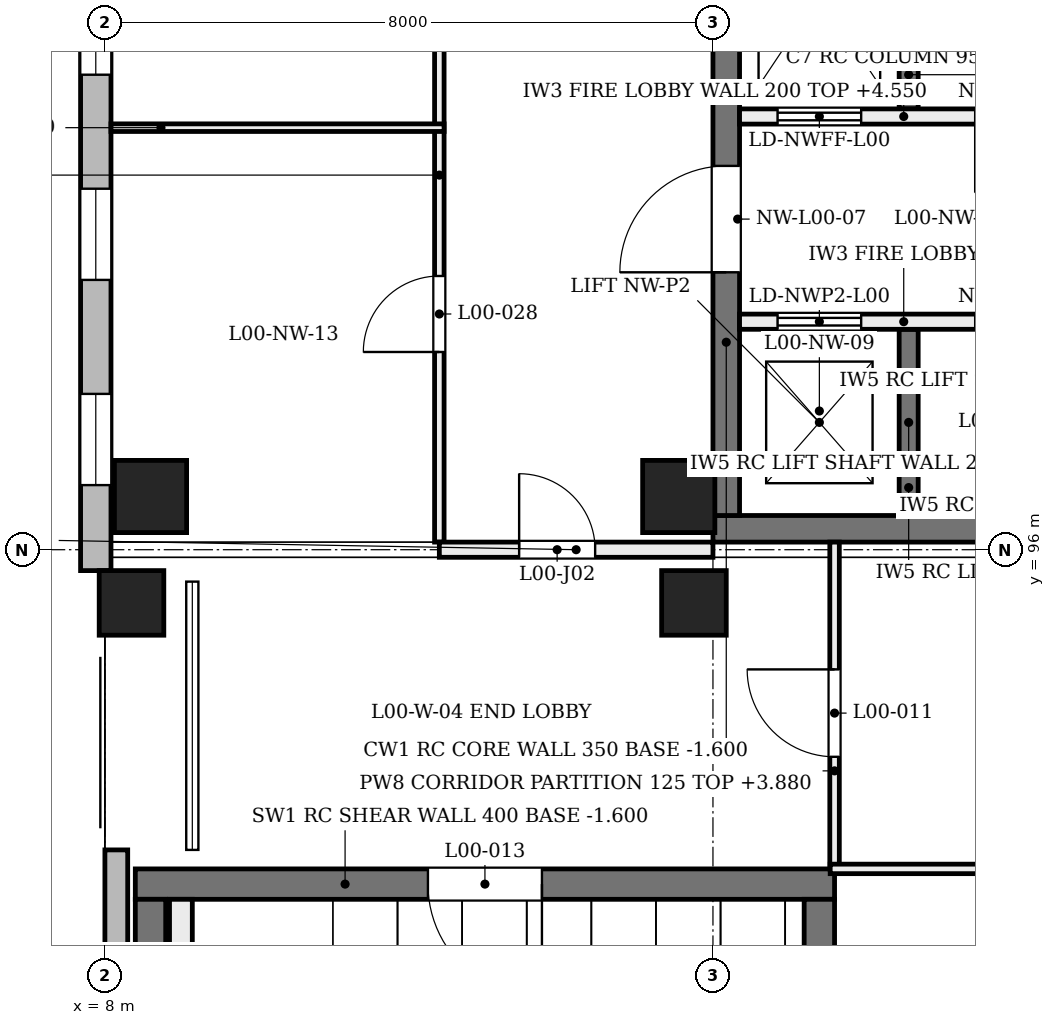
"""IFC4 building model, lengths in metres.
Left out: names, types, materials, properties, quantities, classifications, styles, units other than length and angle.
Written with IfcOpenShell. Run it as: python <this file> out.ifc"""

import sys

from ifc_helpers import new_model, si_unit, direction, frame, frame_2d, origin, origin_2d, place, context, subcontext, project, spatial, rectangle, extrude, element, fill, save


model = new_model("IFC4")
c1 = context("Model", 3, precision=1e-05, world=origin(), true_north=direction((0.0, 1.0)))
c2 = subcontext(c1, "Body", "Model", "MODEL_VIEW")
j1 = project(units=[si_unit("LENGTHUNIT", "METRE"), si_unit("PLANEANGLEUNIT", "RADIAN")], contexts=[c1])
p1 = place(None, origin())
s1 = spatial("IfcSite", under=j1, at=p1, CompositionType="ELEMENT")
p2 = place(p1, origin())
s2 = spatial("IfcBuilding", under=s1, at=p2, CompositionType="ELEMENT")
p3 = place(p2, origin())
s3 = spatial("IfcBuildingStorey", under=s2, at=p3, CompositionType="ELEMENT", Elevation=0.0)
p4 = place(p3, frame((8.4, 91.6, -1.6), z_axis=(0.0, 0.0, 1.0), x_axis=(1.0, 0.0, 0.0)))
e1 = element("IfcWall", 1, at=p4, inside=s3, PredefinedType="SHEAR", context=c2, shape_type="SweptSolid", body=[
    extrude(rectangle(XDim=9.2, YDim=0.4, at=frame_2d((4.6, 0.0))), origin(), (0.0, 0.0, 1.0), 6.18),
])
p5 = place(p4, frame((3.85, 0.0, 1.6)))
e2 = element("IfcOpeningElement", 2, at=p5, cuts=e1, PredefinedType="OPENING", context=c2, shape_type="SweptSolid", body=[
    extrude(rectangle(XDim=1.5, YDim=2.1, at=frame_2d((0.75, 1.05))), frame((0.0, 0.21, 0.0), z_axis=(0.0, -1.0, 0.0), x_axis=(1.0, 0.0, 0.0)), (0.0, 0.0, 1.0), 0.42),
])
p6 = place(p3, frame((8.6, 84.0, -1.6), z_axis=(0.0, 0.0, 1.0), x_axis=(0.0, 1.0, 0.0)))
e3 = element("IfcWall", 3, at=p6, inside=s3, PredefinedType="SHEAR", context=c2, shape_type="SweptSolid", body=[
    extrude(rectangle(XDim=7.4, YDim=0.4, at=frame_2d((3.7, 0.0))), origin(), (0.0, 0.0, 1.0), 6.18),
])
p7 = place(p3, frame((17.4, 84.0, -1.6), z_axis=(0.0, 0.0, 1.0), x_axis=(0.0, 1.0, 0.0)))
e4 = element("IfcWall", 4, at=p7, inside=s3, PredefinedType="SHEAR", context=c2, shape_type="SweptSolid", body=[
    extrude(rectangle(XDim=7.4, YDim=0.4, at=frame_2d((3.7, 0.0))), origin(), (0.0, 0.0, 1.0), 6.18),
])
p8 = place(p7, frame((3.4, 0.0, 5.48)))
e5 = element("IfcOpeningElement", 5, at=p8, cuts=e4, PredefinedType="OPENING", context=c2, shape_type="SweptSolid", body=[
    extrude(rectangle(XDim=0.6, YDim=0.5, at=frame_2d((0.3, 0.25))), frame((0.0, 0.21, 0.0), z_axis=(0.0, -1.0, 0.0), x_axis=(1.0, 0.0, 0.0)), (0.0, 0.0, 1.0), 0.42),
])
p9 = place(p3, frame((16.0, 96.275, -1.6), z_axis=(0.0, 0.0, 1.0), x_axis=(1.0, 0.0, 0.0)))
e6 = element("IfcWall", 6, at=p9, inside=s3, PredefinedType="SHEAR", context=c2, shape_type="SweptSolid", body=[
    extrude(rectangle(XDim=8.275, YDim=0.35, at=frame_2d((4.137, 0.0))), origin(), (0.0, 0.0, 1.0), 6.18),
])
p10 = place(p3, frame((16.175, 96.45, -1.6), z_axis=(0.0, 0.0, 1.0), x_axis=(0.0, 1.0, 0.0)))
e7 = element("IfcWall", 7, at=p10, inside=s3, PredefinedType="SHEAR", context=c2, shape_type="SweptSolid", body=[
    extrude(rectangle(XDim=15.2, YDim=0.35, at=frame_2d((7.6, 0.0))), origin(), (0.0, 0.0, 1.0), 6.18),
])
p11 = place(p10, frame((13.25, 0.0, 1.6)))
e8 = element("IfcOpeningElement", 8, at=p11, cuts=e7, PredefinedType="OPENING", context=c2, shape_type="SweptSolid", body=[
    extrude(rectangle(XDim=1.0, YDim=2.1, at=frame_2d((0.5, 1.05))), frame((0.0, 0.185, 0.0), z_axis=(0.0, -1.0, 0.0), x_axis=(1.0, 0.0, 0.0)), (0.0, 0.0, 1.0), 0.37),
])
p12 = place(p10, frame((3.2, 0.0, 1.6)))
e9 = element("IfcOpeningElement", 9, at=p12, cuts=e7, PredefinedType="OPENING", context=c2, shape_type="SweptSolid", body=[
    extrude(rectangle(XDim=1.4, YDim=2.1, at=frame_2d((0.7, 1.05))), frame((0.0, 0.185, 0.0), z_axis=(0.0, -1.0, 0.0), x_axis=(1.0, 0.0, 0.0)), (0.0, 0.0, 1.0), 0.37),
])
for number, where, z_axis, x_axis in (
    (10, (8.6, 96.7, -1.6), (0.0, 0.0, 1.0), (1.0, 0.0, 0.0)),
    (11, (15.55, 96.7, -1.6), (0.0, 0.0, 1.0), (1.0, 0.0, 0.0)),
):
    element("IfcColumn", number, at=place(p3, frame(where, z_axis=z_axis, x_axis=x_axis)), inside=s3, PredefinedType="COLUMN", context=c2, shape_type="SweptSolid", body=[
        extrude(rectangle(XDim=0.95, YDim=0.95, at=origin_2d()), origin(), (0.0, 0.0, 1.0), 6.4),
    ])
for number, where, z_axis, x_axis in (
    (12, (8.933, 95.3, -1.6), (-0.204, 0.0, 0.979), (0.0, -1.0, 0.0)),
    (13, (16.333, 95.3, -1.6), (-0.204, 0.0, 0.979), (0.0, -1.0, 0.0)),
):
    element("IfcColumn", number, at=place(p3, frame(where, z_axis=z_axis, x_axis=x_axis)), inside=s3, PredefinedType="COLUMN", context=c2, shape_type="SweptSolid", body=[
        extrude(rectangle(XDim=0.85, YDim=0.85, at=origin_2d()), origin(), (0.0, 0.0, 1.0), 6.538),
    ])
p13 = place(p3, frame((8.15, 71.35, 0.0), z_axis=(0.0, 0.0, 1.0), x_axis=(0.0, 1.0, 0.0)))
e14 = element("IfcWall", 14, at=p13, inside=s3, PredefinedType="SOLIDWALL", context=c2, shape_type="SweptSolid", body=[
    extrude(rectangle(XDim=20.7, YDim=0.3, at=frame_2d((10.35, 0.0))), origin(), (0.0, 0.0, 1.0), 3.9),
])
p14 = place(p3, frame((7.88, 95.725, 0.0), z_axis=(0.0, 0.0, 1.0), x_axis=(0.0, 1.0, 0.0)))
e15 = element("IfcWall", 15, at=p14, inside=s3, PredefinedType="SOLIDWALL", context=c2, shape_type="SweptSolid", body=[
    extrude(rectangle(XDim=16.575, YDim=0.4, at=frame_2d((8.288, 0.0))), origin(), (0.0, 0.0, 1.0), 3.9),
])
p15 = place(p14, frame((1.125, 0.0, 1.9)))
e16 = element("IfcOpeningElement", 16, at=p15, cuts=e15, PredefinedType="OPENING", context=c2, shape_type="SweptSolid", body=[
    extrude(rectangle(XDim=1.2, YDim=1.5, at=frame_2d((0.6, 0.75))), frame((0.0, 0.21, 0.0), z_axis=(0.0, -1.0, 0.0), x_axis=(1.0, 0.0, 0.0)), (0.0, 0.0, 1.0), 0.42),
])
p16 = place(p14, frame((3.825, 0.0, 1.9)))
e17 = element("IfcOpeningElement", 17, at=p16, cuts=e15, PredefinedType="OPENING", context=c2, shape_type="SweptSolid", body=[
    extrude(rectangle(XDim=1.2, YDim=1.5, at=frame_2d((0.6, 0.75))), frame((0.0, 0.21, 0.0), z_axis=(0.0, -1.0, 0.0), x_axis=(1.0, 0.0, 0.0)), (0.0, 0.0, 1.0), 0.42),
])
p17 = place(p14, frame((6.525, 0.0, 1.9)))
e18 = element("IfcOpeningElement", 18, at=p17, cuts=e15, PredefinedType="OPENING", context=c2, shape_type="SweptSolid", body=[
    extrude(rectangle(XDim=1.2, YDim=1.5, at=frame_2d((0.6, 0.75))), frame((0.0, 0.21, 0.0), z_axis=(0.0, -1.0, 0.0), x_axis=(1.0, 0.0, 0.0)), (0.0, 0.0, 1.0), 0.42),
])
p18 = place(p14, frame((9.225, 0.0, 1.9)))
e19 = element("IfcOpeningElement", 19, at=p18, cuts=e15, PredefinedType="OPENING", context=c2, shape_type="SweptSolid", body=[
    extrude(rectangle(XDim=1.2, YDim=1.5, at=frame_2d((0.6, 0.75))), frame((0.0, 0.21, 0.0), z_axis=(0.0, -1.0, 0.0), x_axis=(1.0, 0.0, 0.0)), (0.0, 0.0, 1.0), 0.42),
])
p19 = place(p14, frame((11.925, 0.0, 1.9)))
e20 = element("IfcOpeningElement", 20, at=p19, cuts=e15, PredefinedType="OPENING", context=c2, shape_type="SweptSolid", body=[
    extrude(rectangle(XDim=1.2, YDim=1.5, at=frame_2d((0.6, 0.75))), frame((0.0, 0.21, 0.0), z_axis=(0.0, -1.0, 0.0), x_axis=(1.0, 0.0, 0.0)), (0.0, 0.0, 1.0), 0.42),
])
p20 = place(p14, frame((14.625, 0.0, 1.9)))
e21 = element("IfcOpeningElement", 21, at=p20, cuts=e15, PredefinedType="OPENING", context=c2, shape_type="SweptSolid", body=[
    extrude(rectangle(XDim=1.2, YDim=1.5, at=frame_2d((0.6, 0.75))), frame((0.0, 0.21, 0.0), z_axis=(0.0, -1.0, 0.0), x_axis=(1.0, 0.0, 0.0)), (0.0, 0.0, 1.0), 0.42),
])
p21 = place(p3, frame((18.575, 104.8, 0.0), z_axis=(0.0, 0.0, 1.0), x_axis=(0.0, -1.0, 0.0)))
e22 = element("IfcWall", 22, at=p21, inside=s3, PredefinedType="SOLIDWALL", context=c2, shape_type="SweptSolid", body=[
    extrude(rectangle(XDim=3.0, YDim=0.25, at=frame_2d((1.5, 0.0))), origin(), (0.0, 0.0, 1.0), 4.55),
])
p22 = place(p3, frame((18.575, 104.8, -1.6), z_axis=(0.0, 0.0, 1.0), x_axis=(0.0, -1.0, 0.0)))
e23 = element("IfcWall", 23, at=p22, inside=s3, PredefinedType="SOLIDWALL", context=c2, shape_type="SweptSolid", body=[
    extrude(rectangle(XDim=3.0, YDim=0.25, at=frame_2d((1.5, 0.0))), origin(), (0.0, 0.0, 1.0), 1.35),
])
p23 = place(p3, frame((18.575, 98.9, 0.0), z_axis=(0.0, 0.0, 1.0), x_axis=(0.0, -1.0, 0.0)))
e24 = element("IfcWall", 24, at=p23, inside=s3, PredefinedType="SOLIDWALL", context=c2, shape_type="SweptSolid", body=[
    extrude(rectangle(XDim=2.45, YDim=0.25, at=frame_2d((1.225, 0.0))), origin(), (0.0, 0.0, 1.0), 4.55),
])
p24 = place(p3, frame((18.575, 98.9, -1.6), z_axis=(0.0, 0.0, 1.0), x_axis=(0.0, -1.0, 0.0)))
e25 = element("IfcWall", 25, at=p24, inside=s3, PredefinedType="SOLIDWALL", context=c2, shape_type="SweptSolid", body=[
    extrude(rectangle(XDim=2.45, YDim=0.25, at=frame_2d((1.225, 0.0))), origin(), (0.0, 0.0, 1.0), 1.35),
])
p25 = place(p3, frame((16.35, 101.7, 0.0), z_axis=(0.0, 0.0, 1.0), x_axis=(1.0, 0.0, 0.0)))
e26 = element("IfcWall", 26, at=p25, inside=s3, PredefinedType="SOLIDWALL", context=c2, shape_type="SweptSolid", body=[
    extrude(rectangle(XDim=7.2, YDim=0.2, at=frame_2d((3.6, 0.0))), origin(), (0.0, 0.0, 1.0), 4.55),
])
p26 = place(p25, frame((0.5, 0.0, 0.0)))
e27 = element("IfcOpeningElement", 27, at=p26, cuts=e26, PredefinedType="OPENING", context=c2, shape_type="SweptSolid", body=[
    extrude(rectangle(XDim=1.1, YDim=2.1, at=frame_2d((0.55, 1.05))), frame((0.0, 0.11, 0.0), z_axis=(0.0, -1.0, 0.0), x_axis=(1.0, 0.0, 0.0)), (0.0, 0.0, 1.0), 0.22),
])
p27 = place(p25, frame((5.6, 0.0, 0.0)))
e28 = element("IfcOpeningElement", 28, at=p27, cuts=e26, PredefinedType="OPENING", context=c2, shape_type="SweptSolid", body=[
    extrude(rectangle(XDim=1.1, YDim=2.1, at=frame_2d((0.55, 1.05))), frame((0.0, 0.11, 0.0), z_axis=(0.0, -1.0, 0.0), x_axis=(1.0, 0.0, 0.0)), (0.0, 0.0, 1.0), 0.22),
])
p28 = place(p25, frame((3.1, 0.0, 0.0)))
e29 = element("IfcOpeningElement", 29, at=p28, cuts=e26, PredefinedType="OPENING", context=c2, shape_type="SweptSolid", body=[
    extrude(rectangle(XDim=1.0, YDim=2.1, at=frame_2d((0.5, 1.05))), frame((0.0, 0.11, 0.0), z_axis=(0.0, -1.0, 0.0), x_axis=(1.0, 0.0, 0.0)), (0.0, 0.0, 1.0), 0.22),
])
p29 = place(p3, frame((16.35, 99.0, 0.0), z_axis=(0.0, 0.0, 1.0), x_axis=(1.0, 0.0, 0.0)))
e30 = element("IfcWall", 30, at=p29, inside=s3, PredefinedType="SOLIDWALL", context=c2, shape_type="SweptSolid", body=[
    extrude(rectangle(XDim=7.2, YDim=0.2, at=frame_2d((3.6, 0.0))), origin(), (0.0, 0.0, 1.0), 4.55),
])
p30 = place(p29, frame((0.5, 0.0, 0.0)))
e31 = element("IfcOpeningElement", 31, at=p30, cuts=e30, PredefinedType="OPENING", context=c2, shape_type="SweptSolid", body=[
    extrude(rectangle(XDim=1.1, YDim=2.1, at=frame_2d((0.55, 1.05))), frame((0.0, 0.11, 0.0), z_axis=(0.0, -1.0, 0.0), x_axis=(1.0, 0.0, 0.0)), (0.0, 0.0, 1.0), 0.22),
])
p31 = place(p29, frame((5.6, 0.0, 0.0)))
e32 = element("IfcOpeningElement", 32, at=p31, cuts=e30, PredefinedType="OPENING", context=c2, shape_type="SweptSolid", body=[
    extrude(rectangle(XDim=1.1, YDim=2.1, at=frame_2d((0.55, 1.05))), frame((0.0, 0.11, 0.0), z_axis=(0.0, -1.0, 0.0), x_axis=(1.0, 0.0, 0.0)), (0.0, 0.0, 1.0), 0.22),
])
p32 = place(p29, frame((3.1, 0.0, 0.0)))
e33 = element("IfcOpeningElement", 33, at=p32, cuts=e30, PredefinedType="OPENING", context=c2, shape_type="SweptSolid", body=[
    extrude(rectangle(XDim=1.0, YDim=2.1, at=frame_2d((0.5, 1.05))), frame((0.0, 0.11, 0.0), z_axis=(0.0, -1.0, 0.0), x_axis=(1.0, 0.0, 0.0)), (0.0, 0.0, 1.0), 0.22),
])
p33 = place(p3, frame((17.6, 91.8, 0.0), z_axis=(0.0, 0.0, 1.0), x_axis=(0.0, 1.0, 0.0)))
e34 = element("IfcWall", 34, at=p33, inside=s3, PredefinedType="PARTITIONING", context=c2, shape_type="SweptSolid", body=[
    extrude(rectangle(XDim=4.3, YDim=0.125, at=frame_2d((2.15, 0.0))), origin(), (0.0, 0.0, 1.0), 3.88),
])
p34 = place(p33, frame((1.475, 0.0, 0.0)))
e35 = element("IfcOpeningElement", 35, at=p34, cuts=e34, PredefinedType="OPENING", context=c2, shape_type="SweptSolid", body=[
    extrude(rectangle(XDim=1.15, YDim=2.1, at=frame_2d((0.575, 1.05))), frame((0.0, 0.073, 0.0), z_axis=(0.0, -1.0, 0.0), x_axis=(1.0, 0.0, 0.0)), (0.0, 0.0, 1.0), 0.145),
])
p35 = place(p3, frame((17.542, 91.8, 0.0), z_axis=(0.0, 0.0, 1.0), x_axis=(1.0, 0.0, 0.0)))
e36 = element("IfcWall", 36, at=p35, inside=s3, PredefinedType="PARTITIONING", context=c2, shape_type="SweptSolid", body=[
    extrude(rectangle(XDim=4.228, YDim=0.125, at=frame_2d((2.114, 0.0))), origin(), (0.0, 0.0, 1.0), 4.56),
])
p36 = place(p3, frame((12.4, 96.1, 0.0), z_axis=(0.0, 0.0, 1.0), x_axis=(0.0, 1.0, 0.0)))
e37 = element("IfcWall", 37, at=p36, inside=s3, PredefinedType="PARTITIONING", context=c2, shape_type="SweptSolid", body=[
    extrude(rectangle(XDim=9.658, YDim=0.125, at=frame_2d((4.829, 0.0))), origin(), (0.0, 0.0, 1.0), 3.88),
])
p37 = place(p36, frame((2.501, 0.0, 0.0)))
e38 = element("IfcOpeningElement", 38, at=p37, cuts=e37, PredefinedType="OPENING", context=c2, shape_type="SweptSolid", body=[
    extrude(rectangle(XDim=1.0, YDim=2.1, at=frame_2d((0.5, 1.05))), frame((0.0, 0.073, 0.0), z_axis=(0.0, -1.0, 0.0), x_axis=(1.0, 0.0, 0.0)), (0.0, 0.0, 1.0), 0.145),
])
p38 = place(p3, frame((8.08, 101.553, 0.0), z_axis=(0.0, 0.0, 1.0), x_axis=(1.0, 0.0, 0.0)))
e39 = element("IfcWall", 39, at=p38, inside=s3, PredefinedType="PARTITIONING", context=c2, shape_type="SweptSolid", body=[
    extrude(rectangle(XDim=4.382, YDim=0.1, at=frame_2d((2.191, 0.0))), origin(), (0.0, 0.0, 1.0), 3.88),
])
p39 = place(p3, frame((12.4, 96.0, 0.0), z_axis=(0.0, 0.0, 1.0), x_axis=(1.0, 0.0, 0.0)))
e40 = element("IfcWall", 40, at=p39, inside=s3, PredefinedType="PARTITIONING", context=c2, shape_type="SweptSolid", body=[
    extrude(rectangle(XDim=3.6, YDim=0.2, at=frame_2d((1.8, 0.0))), origin(), (0.0, 0.0, 1.0), 3.88),
])
p40 = place(p39, frame((1.05, 0.0, 0.0)))
e41 = element("IfcOpeningElement", 41, at=p40, cuts=e40, PredefinedType="OPENING", context=c2, shape_type="SweptSolid", body=[
    extrude(rectangle(XDim=1.0, YDim=2.1, at=frame_2d((0.5, 1.05))), frame((0.0, 0.11, 0.0), z_axis=(0.0, -1.0, 0.0), x_axis=(1.0, 0.0, 0.0)), (0.0, 0.0, 1.0), 0.22),
])
p41 = place(p3, frame((9.0, 84.0, 0.0), z_axis=(0.0, 0.0, 1.0), x_axis=(0.0, 1.0, 0.0)))
e42 = element("IfcWall", 42, at=p41, inside=s3, PredefinedType="PARTITIONING", context=c2, shape_type="SweptSolid", body=[
    extrude(rectangle(XDim=7.4, YDim=0.3, at=frame_2d((3.7, 0.0))), origin(), (0.0, 0.0, 1.0), 6.95),
])
p42 = place(p15, origin())
e43 = element("IfcWindow", 43, at=p42, inside=s3, PartitioningType="SINGLE_PANEL", PredefinedType="WINDOW", context=c2, shape_type="SweptSolid", body=[
    extrude(rectangle(XDim=1.2, YDim=1.5, at=frame_2d((0.6, 0.75))), frame((0.0, 0.03, 0.0), z_axis=(0.0, -1.0, 0.0), x_axis=(1.0, 0.0, 0.0)), (0.0, 0.0, 1.0), 0.06),
])
fill(e16, e43)
p43 = place(p16, origin())
e44 = element("IfcWindow", 44, at=p43, inside=s3, PartitioningType="SINGLE_PANEL", PredefinedType="WINDOW", context=c2, shape_type="SweptSolid", body=[
    extrude(rectangle(XDim=1.2, YDim=1.5, at=frame_2d((0.6, 0.75))), frame((0.0, 0.03, 0.0), z_axis=(0.0, -1.0, 0.0), x_axis=(1.0, 0.0, 0.0)), (0.0, 0.0, 1.0), 0.06),
])
fill(e17, e44)
p44 = place(p17, origin())
e45 = element("IfcWindow", 45, at=p44, inside=s3, PartitioningType="SINGLE_PANEL", PredefinedType="WINDOW", context=c2, shape_type="SweptSolid", body=[
    extrude(rectangle(XDim=1.2, YDim=1.5, at=frame_2d((0.6, 0.75))), frame((0.0, 0.03, 0.0), z_axis=(0.0, -1.0, 0.0), x_axis=(1.0, 0.0, 0.0)), (0.0, 0.0, 1.0), 0.06),
])
fill(e18, e45)
p45 = place(p26, frame((1.1, 0.0, 0.0), z_axis=(0.0, 0.0, 1.0), x_axis=(-1.0, 0.0, 0.0)))
e46 = element("IfcDoor", 46, at=p45, inside=s3, OperationType="DOUBLE_DOOR_SLIDING", PredefinedType="DOOR", context=c2, shape_type="SweptSolid", body=[
    extrude(rectangle(XDim=1.1, YDim=2.1, at=frame_2d((0.55, 1.05))), frame((0.0, 0.025, 0.0), z_axis=(0.0, -1.0, 0.0), x_axis=(1.0, 0.0, 0.0)), (0.0, 0.0, 1.0), 0.05),
])
fill(e27, e46)
p46 = place(p30, origin())
e47 = element("IfcDoor", 47, at=p46, inside=s3, OperationType="DOUBLE_DOOR_SLIDING", PredefinedType="DOOR", context=c2, shape_type="SweptSolid", body=[
    extrude(rectangle(XDim=1.1, YDim=2.1, at=frame_2d((0.55, 1.05))), frame((0.0, 0.025, 0.0), z_axis=(0.0, -1.0, 0.0), x_axis=(1.0, 0.0, 0.0)), (0.0, 0.0, 1.0), 0.05),
])
fill(e31, e47)
p47 = place(p12, origin())
e48 = element("IfcDoor", 48, at=p47, inside=s3, OperationType="SINGLE_SWING_LEFT", PredefinedType="DOOR", context=c2, shape_type="SweptSolid", body=[
    extrude(rectangle(XDim=1.4, YDim=2.1, at=frame_2d((0.7, 1.05))), frame((0.0, 0.025, 0.0), z_axis=(0.0, -1.0, 0.0), x_axis=(1.0, 0.0, 0.0)), (0.0, 0.0, 1.0), 0.05),
])
fill(e9, e48)
p48 = place(p34, frame((1.15, 0.0, 0.0), z_axis=(0.0, 0.0, 1.0), x_axis=(-1.0, 0.0, 0.0)))
e49 = element("IfcDoor", 49, at=p48, inside=s3, OperationType="SINGLE_SWING_RIGHT", PredefinedType="DOOR", context=c2, shape_type="SweptSolid", body=[
    extrude(rectangle(XDim=1.15, YDim=2.1, at=frame_2d((0.575, 1.05))), frame((0.0, 0.025, 0.0), z_axis=(0.0, -1.0, 0.0), x_axis=(1.0, 0.0, 0.0)), (0.0, 0.0, 1.0), 0.05),
])
fill(e35, e49)
p49 = place(p5, origin())
e50 = element("IfcDoor", 50, at=p49, inside=s3, OperationType="SINGLE_SWING_RIGHT", PredefinedType="DOOR", context=c2, shape_type="SweptSolid", body=[
    extrude(rectangle(XDim=1.5, YDim=2.1, at=frame_2d((0.75, 1.05))), frame((0.0, 0.025, 0.0), z_axis=(0.0, -1.0, 0.0), x_axis=(1.0, 0.0, 0.0)), (0.0, 0.0, 1.0), 0.05),
])
fill(e2, e50)
p50 = place(p37, origin())
e51 = element("IfcDoor", 51, at=p50, inside=s3, OperationType="SINGLE_SWING_LEFT", PredefinedType="DOOR", context=c2, shape_type="SweptSolid", body=[
    extrude(rectangle(XDim=1.0, YDim=2.1, at=frame_2d((0.5, 1.05))), frame((0.0, 0.025, 0.0), z_axis=(0.0, -1.0, 0.0), x_axis=(1.0, 0.0, 0.0)), (0.0, 0.0, 1.0), 0.05),
])
fill(e38, e51)
p51 = place(p40, origin())
e52 = element("IfcDoor", 52, at=p51, inside=s3, OperationType="SINGLE_SWING_LEFT", PredefinedType="DOOR", context=c2, shape_type="SweptSolid", body=[
    extrude(rectangle(XDim=1.0, YDim=2.1, at=frame_2d((0.5, 1.05))), frame((0.0, 0.025, 0.0), z_axis=(0.0, -1.0, 0.0), x_axis=(1.0, 0.0, 0.0)), (0.0, 0.0, 1.0), 0.05),
])
fill(e41, e52)
save(model, sys.argv[1])
